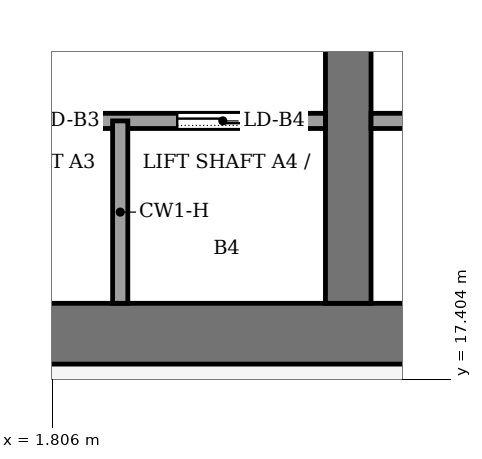
"""IFC4 building model, lengths in metres.
Left out: names, types, materials, properties, quantities, classifications, styles, units other than length and angle.
Written with IfcOpenShell. Run it as: python <this file> out.ifc"""

import sys

from ifc_helpers import new_model, si_unit, direction, frame, frame_2d, origin, place, context, subcontext, project, spatial, rectangle, extrude, element, fill, save


model = new_model("IFC4")
c1 = context("Model", 3, precision=1e-05, world=origin(), true_north=direction((0.0, 1.0)))
c2 = subcontext(c1, "Body", "Model", "MODEL_VIEW")
j1 = project(units=[si_unit("LENGTHUNIT", "METRE"), si_unit("PLANEANGLEUNIT", "RADIAN")], contexts=[c1])
p1 = place(None, origin())
s1 = spatial("IfcSite", under=j1, at=p1, CompositionType="ELEMENT")
p2 = place(p1, origin())
s2 = spatial("IfcBuilding", under=s1, at=p2, CompositionType="ELEMENT")
p3 = place(p2, frame((0.0, 0.0, 278.0)))
s3 = spatial("IfcBuildingStorey", under=s2, at=p3, CompositionType="ELEMENT", Elevation=278.0)
p4 = place(p3, frame((-13.4, 18.0, -0.13), z_axis=(0.0, 0.0, 1.0), x_axis=(1.0, 0.0, 0.0)))
e1 = element("IfcWall", 1, at=p4, inside=s3, PredefinedType="SHEAR", context=c2, shape_type="SweptSolid", body=[
    extrude(rectangle(XDim=26.8, YDim=0.8, at=frame_2d((13.4, 0.0))), origin(), (0.0, 0.0, 1.0), 3.88),
])
p5 = place(p3, frame((5.7, 18.4, -0.13), z_axis=(0.0, 0.0, 1.0), x_axis=(0.0, 1.0, 0.0)))
e2 = element("IfcWall", 2, at=p5, inside=s3, PredefinedType="SHEAR", context=c2, shape_type="SweptSolid", body=[
    extrude(rectangle(XDim=19.2, YDim=0.6, at=frame_2d((9.6, 0.0))), origin(), (0.0, 0.0, 1.0), 3.88),
])
p6 = place(p5, frame((8.35, 0.0, 0.13)))
e3 = element("IfcOpeningElement", 3, at=p6, cuts=e2, PredefinedType="OPENING", context=c2, shape_type="SweptSolid", body=[
    extrude(rectangle(XDim=0.9, YDim=2.1, at=frame_2d((0.45, 1.05))), frame((0.0, 0.31, 0.0), z_axis=(0.0, -1.0, 0.0), x_axis=(1.0, 0.0, 0.0)), (0.0, 0.0, 1.0), 0.62),
])
p7 = place(p5, frame((13.3, 0.0, 0.13)))
e4 = element("IfcOpeningElement", 4, at=p7, cuts=e2, PredefinedType="OPENING", context=c2, shape_type="SweptSolid", body=[
    extrude(rectangle(XDim=2.4, YDim=2.4, at=frame_2d((1.2, 1.2))), frame((0.0, 0.31, 0.0), z_axis=(0.0, -1.0, 0.0), x_axis=(1.0, 0.0, 0.0)), (0.0, 0.0, 1.0), 0.62),
])
p8 = place(p3, frame((-5.4, 20.8, 0.0), z_axis=(0.0, 0.0, 1.0), x_axis=(1.0, 0.0, 0.0)))
e5 = element("IfcWall", 5, at=p8, inside=s3, PredefinedType="PARTITIONING", context=c2, shape_type="SweptSolid", body=[
    extrude(rectangle(XDim=10.8, YDim=0.2, at=frame_2d((5.4, 0.0))), origin(), (0.0, 0.0, 1.0), 3.75),
])
p9 = place(p8, frame((0.75, 0.0, 0.0)))
e6 = element("IfcOpeningElement", 6, at=p9, cuts=e5, PredefinedType="OPENING", context=c2, shape_type="SweptSolid", body=[
    extrude(rectangle(XDim=1.2, YDim=2.2, at=frame_2d((0.6, 1.1))), frame((0.0, 0.11, 0.0), z_axis=(0.0, -1.0, 0.0), x_axis=(1.0, 0.0, 0.0)), (0.0, 0.0, 1.0), 0.22),
])
p10 = place(p8, frame((3.45, 0.0, 0.0)))
e7 = element("IfcOpeningElement", 7, at=p10, cuts=e5, PredefinedType="OPENING", context=c2, shape_type="SweptSolid", body=[
    extrude(rectangle(XDim=1.2, YDim=2.2, at=frame_2d((0.6, 1.1))), frame((0.0, 0.11, 0.0), z_axis=(0.0, -1.0, 0.0), x_axis=(1.0, 0.0, 0.0)), (0.0, 0.0, 1.0), 0.22),
])
p11 = place(p8, frame((6.15, 0.0, 0.0)))
e8 = element("IfcOpeningElement", 8, at=p11, cuts=e5, PredefinedType="OPENING", context=c2, shape_type="SweptSolid", body=[
    extrude(rectangle(XDim=1.2, YDim=2.2, at=frame_2d((0.6, 1.1))), frame((0.0, 0.11, 0.0), z_axis=(0.0, -1.0, 0.0), x_axis=(1.0, 0.0, 0.0)), (0.0, 0.0, 1.0), 0.22),
])
p12 = place(p8, frame((8.85, 0.0, 0.0)))
e9 = element("IfcOpeningElement", 9, at=p12, cuts=e5, PredefinedType="OPENING", context=c2, shape_type="SweptSolid", body=[
    extrude(rectangle(XDim=1.2, YDim=2.2, at=frame_2d((0.6, 1.1))), frame((0.0, 0.11, 0.0), z_axis=(0.0, -1.0, 0.0), x_axis=(1.0, 0.0, 0.0)), (0.0, 0.0, 1.0), 0.22),
])
p13 = place(p3, frame((6.0, 20.8, 0.0), z_axis=(0.0, 0.0, 1.0), x_axis=(1.0, 0.0, 0.0)))
e10 = element("IfcWall", 10, at=p13, inside=s3, PredefinedType="PARTITIONING", context=c2, shape_type="SweptSolid", body=[
    extrude(rectangle(XDim=6.6, YDim=0.2, at=frame_2d((3.3, 0.0))), origin(), (0.0, 0.0, 1.0), 3.75),
])
p14 = place(p13, frame((2.8, 0.0, 0.0)))
e11 = element("IfcOpeningElement", 11, at=p14, cuts=e10, PredefinedType="OPENING", context=c2, shape_type="SweptSolid", body=[
    extrude(rectangle(XDim=1.0, YDim=2.1, at=frame_2d((0.5, 1.05))), frame((0.0, 0.11, 0.0), z_axis=(0.0, -1.0, 0.0), x_axis=(1.0, 0.0, 0.0)), (0.0, 0.0, 1.0), 0.22),
])
p15 = place(p3, frame((2.7, 18.4, 0.0), z_axis=(0.0, 0.0, 1.0), x_axis=(0.0, 1.0, 0.0)))
e12 = element("IfcWall", 12, at=p15, inside=s3, PredefinedType="PARTITIONING", context=c2, shape_type="SweptSolid", body=[
    extrude(rectangle(XDim=2.4, YDim=0.2, at=frame_2d((1.2, 0.0))), origin(), (0.0, 0.0, 1.0), 3.75),
])
p16 = place(p11, origin())
e13 = element("IfcDoor", 13, at=p16, inside=s3, OperationType="SLIDING_TO_LEFT", PredefinedType="DOOR", context=c2, shape_type="SweptSolid", body=[
    extrude(rectangle(XDim=1.2, YDim=2.2, at=frame_2d((0.6, 1.1))), frame((0.0, 0.025, 0.0), z_axis=(0.0, -1.0, 0.0), x_axis=(1.0, 0.0, 0.0)), (0.0, 0.0, 1.0), 0.05),
])
fill(e8, e13)
p17 = place(p12, origin())
e14 = element("IfcDoor", 14, at=p17, inside=s3, OperationType="SLIDING_TO_LEFT", PredefinedType="DOOR", context=c2, shape_type="SweptSolid", body=[
    extrude(rectangle(XDim=1.2, YDim=2.2, at=frame_2d((0.6, 1.1))), frame((0.0, 0.025, 0.0), z_axis=(0.0, -1.0, 0.0), x_axis=(1.0, 0.0, 0.0)), (0.0, 0.0, 1.0), 0.05),
])
fill(e9, e14)
save(model, sys.argv[1])
